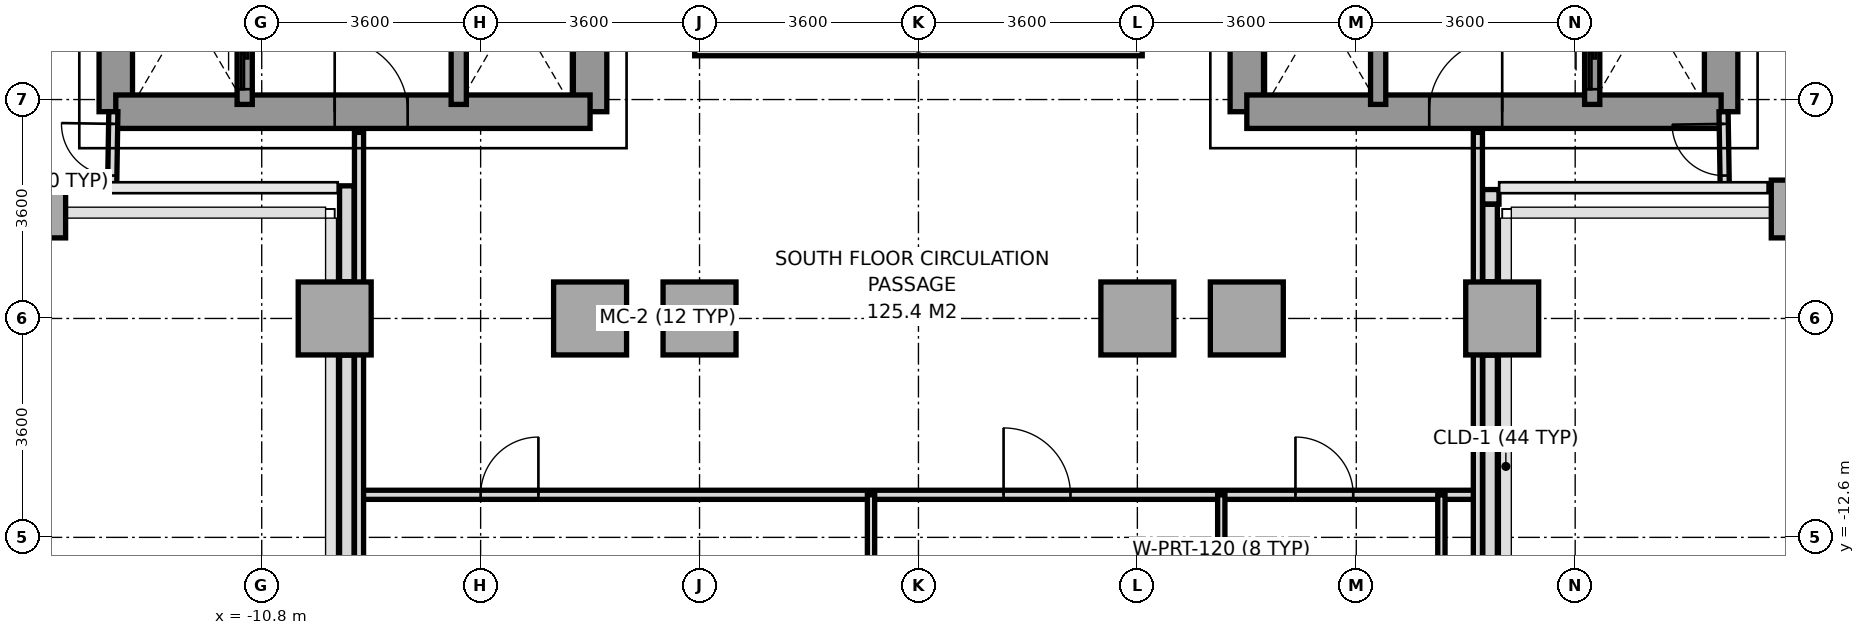
"""IFC4 building model, lengths in metres.
Left out: names, types, materials, properties, quantities, classifications, styles, units other than length and angle.
Written with IfcOpenShell. Run it as: python <this file> out.ifc"""

import sys

from ifc_helpers import new_model, si_unit, direction, frame, frame_2d, origin, origin_2d, place, context, subcontext, project, spatial, rectangle, extrude, source, transform, mapped, element, fill, save


model = new_model("IFC4")
c1 = context("Model", 3, precision=1e-05, world=origin(), true_north=direction((0.0, 1.0)))
c2 = subcontext(c1, "Body", "Model", "MODEL_VIEW")
j1 = project(units=[si_unit("LENGTHUNIT", "METRE"), si_unit("PLANEANGLEUNIT", "RADIAN")], contexts=[c1])
p1 = place(None, origin())
s1 = spatial("IfcSite", under=j1, at=p1, CompositionType="ELEMENT")
p2 = place(p1, origin())
s2 = spatial("IfcBuilding", under=s1, at=p2, CompositionType="ELEMENT")
p3 = place(p2, frame((0.0, 0.0, 81.6)))
s3 = spatial("IfcBuildingStorey", under=s2, at=p3, CompositionType="ELEMENT", Elevation=81.6)
m1 = source(origin(), c2, "Body", "SweptSolid", [
    extrude(rectangle(XDim=0.75, YDim=0.95, at=origin_2d()), origin(), (0.0, 0.0, 1.0), 3.2),
])
p4 = place(p3, frame((-14.4, -7.2, 0.0), z_axis=(0.0, 0.0, 1.0), x_axis=(1.0, 0.0, 0.0)))
e1 = element("IfcColumn", 1, at=p4, inside=s3, PredefinedType="COLUMN", context=c2, shape_type="MappedRepresentation", body=[
    mapped(m1, transform((0.0, 0.0, 0.0), x_axis=(1.0, 0.0, 0.0), y_axis=(0.0, 1.0, 0.0), z_axis=(0.0, 0.0, 1.0), scale=1.0)),
])
m2 = source(origin(), c2, "Body", "SweptSolid", [
    extrude(rectangle(XDim=1.2, YDim=1.2, at=origin_2d()), origin(), (0.0, 0.0, 1.0), 3.2),
])
for number, where, z_axis, x_axis in (
    (2, (-9.6, -9.0, 0.0), (0.0, 0.0, 1.0), (1.0, 0.0, 0.0)),
    (3, (-5.4, -9.0, 0.0), (0.0, 0.0, 1.0), (1.0, 0.0, 0.0)),
    (4, (-3.6, -9.0, 0.0), (0.0, 0.0, 1.0), (1.0, 0.0, 0.0)),
    (5, (3.6, -9.0, 0.0), (0.0, 0.0, 1.0), (1.0, 0.0, 0.0)),
    (6, (5.4, -9.0, 0.0), (0.0, 0.0, 1.0), (1.0, 0.0, 0.0)),
    (7, (9.6, -9.0, 0.0), (0.0, 0.0, 1.0), (1.0, 0.0, 0.0)),
):
    element("IfcColumn", number, at=place(p3, frame(where, z_axis=z_axis, x_axis=x_axis)), inside=s3, PredefinedType="COLUMN", context=c2, shape_type="MappedRepresentation", body=[
        mapped(m2, transform((0.0, 0.0, 0.0), x_axis=(1.0, 0.0, 0.0), y_axis=(0.0, 1.0, 0.0), z_axis=(0.0, 0.0, 1.0), scale=1.0)),
    ])
p5 = place(p3, frame((14.4, -7.2, 0.0), z_axis=(0.0, 0.0, 1.0), x_axis=(1.0, 0.0, 0.0)))
e8 = element("IfcColumn", 8, at=p5, inside=s3, PredefinedType="COLUMN", context=c2, shape_type="MappedRepresentation", body=[
    mapped(m1, transform((0.0, 0.0, 0.0), x_axis=(1.0, 0.0, 0.0), y_axis=(0.0, 1.0, 0.0), z_axis=(0.0, 0.0, 1.0), scale=1.0)),
])
p6 = place(p3, frame((9.547, -7.0, 0.0), z_axis=(0.0, 0.0, 1.0), x_axis=(-1.0, 0.0, 0.0)))
e9 = element("IfcWall", 9, at=p6, inside=s3, PredefinedType="PARAPET", context=c2, shape_type="SweptSolid", body=[
    extrude(rectangle(XDim=0.269, YDim=0.24, at=frame_2d((0.135, 0.0))), origin(), (0.0, 0.0, 1.0), 1.15),
])
p7 = place(p3, frame((9.4, -7.123, 0.0), z_axis=(0.0, 0.0, 1.0), x_axis=(0.0, -1.0, 0.0)))
e10 = element("IfcWall", 10, at=p7, inside=s3, PredefinedType="PARAPET", context=c2, shape_type="SweptSolid", body=[
    extrude(rectangle(XDim=1.274, YDim=0.24, at=frame_2d((0.637, 0.0))), origin(), (0.0, 0.0, 1.0), 1.15),
])
p8 = place(p3, frame((9.4, -9.603, 0.0), z_axis=(0.0, 0.0, 1.0), x_axis=(0.0, -1.0, 0.0)))
e11 = element("IfcWall", 11, at=p8, inside=s3, PredefinedType="PARAPET", context=c2, shape_type="SweptSolid", body=[
    extrude(rectangle(XDim=6.0, YDim=0.24, at=frame_2d((3.0, 0.0))), origin(), (0.0, 0.0, 1.0), 1.15),
])
p9 = place(p3, frame((-9.4, -15.358, 0.0), z_axis=(0.0, 0.0, 1.0), x_axis=(0.0, 1.0, 0.0)))
e12 = element("IfcWall", 12, at=p9, inside=s3, PredefinedType="PARAPET", context=c2, shape_type="SweptSolid", body=[
    extrude(rectangle(XDim=5.755, YDim=0.24, at=frame_2d((2.877, 0.0))), origin(), (0.0, 0.0, 1.0), 1.15),
])
p10 = place(p3, frame((-9.4, -8.397, 0.0), z_axis=(0.0, 0.0, 1.0), x_axis=(0.0, 1.0, 0.0)))
e13 = element("IfcWall", 13, at=p10, inside=s3, PredefinedType="PARAPET", context=c2, shape_type="SweptSolid", body=[
    extrude(rectangle(XDim=1.578, YDim=0.24, at=frame_2d((0.789, 0.0))), origin(), (0.0, 0.0, 1.0), 1.15),
])
p11 = place(p3, frame((-13.2, -5.6, 0.0), z_axis=(0.0, 0.0, 1.0), x_axis=(0.0, 1.0, 0.0)))
e14 = element("IfcWall", 14, at=p11, inside=s3, PredefinedType="SHEAR", context=c2, shape_type="SweptSolid", body=[
    extrude(rectangle(XDim=11.2, YDim=0.55, at=frame_2d((5.6, 0.0))), origin(), (0.0, 0.0, 1.0), 3.2),
])
p12 = place(p3, frame((-5.4, -5.6, 0.0), z_axis=(0.0, 0.0, 1.0), x_axis=(0.0, 1.0, 0.0)))
e15 = element("IfcWall", 15, at=p12, inside=s3, PredefinedType="SHEAR", context=c2, shape_type="SweptSolid", body=[
    extrude(rectangle(XDim=12.5, YDim=0.55, at=frame_2d((6.25, 0.0))), origin(), (0.0, 0.0, 1.0), 3.2),
])
p13 = place(p12, frame((4.55, 0.0, 0.0)))
e16 = element("IfcOpeningElement", 16, at=p13, cuts=e15, PredefinedType="OPENING", context=c2, shape_type="SweptSolid", body=[
    extrude(rectangle(XDim=1.2, YDim=2.2, at=frame_2d((0.6, 1.1))), frame((0.0, 0.285, 0.0), z_axis=(0.0, -1.0, 0.0), x_axis=(1.0, 0.0, 0.0)), (0.0, 0.0, 1.0), 0.57),
])
p14 = place(p12, frame((6.86, 0.0, 0.0)))
e17 = element("IfcOpeningElement", 17, at=p14, cuts=e15, PredefinedType="OPENING", context=c2, shape_type="SweptSolid", body=[
    extrude(rectangle(XDim=0.8, YDim=2.1, at=frame_2d((0.4, 1.05))), frame((0.0, 0.285, 0.0), z_axis=(0.0, -1.0, 0.0), x_axis=(1.0, 0.0, 0.0)), (0.0, 0.0, 1.0), 0.57),
])
p15 = place(p12, frame((7.88, 0.0, 0.0)))
e18 = element("IfcOpeningElement", 18, at=p15, cuts=e15, PredefinedType="OPENING", context=c2, shape_type="SweptSolid", body=[
    extrude(rectangle(XDim=0.8, YDim=2.1, at=frame_2d((0.4, 1.05))), frame((0.0, 0.285, 0.0), z_axis=(0.0, -1.0, 0.0), x_axis=(1.0, 0.0, 0.0)), (0.0, 0.0, 1.0), 0.57),
])
p16 = place(p3, frame((-13.2, -5.6, 0.0), z_axis=(0.0, 0.0, 1.0), x_axis=(1.0, 0.0, 0.0)))
e19 = element("IfcWall", 19, at=p16, inside=s3, PredefinedType="SHEAR", context=c2, shape_type="SweptSolid", body=[
    extrude(rectangle(XDim=7.8, YDim=0.55, at=frame_2d((3.9, 0.0))), origin(), (0.0, 0.0, 1.0), 3.2),
])
p17 = place(p16, frame((3.6, 0.0, 0.0)))
e20 = element("IfcOpeningElement", 20, at=p17, cuts=e19, PredefinedType="OPENING", context=c2, shape_type="SweptSolid", body=[
    extrude(rectangle(XDim=1.2, YDim=2.2, at=frame_2d((0.6, 1.1))), frame((0.0, 0.285, 0.0), z_axis=(0.0, -1.0, 0.0), x_axis=(1.0, 0.0, 0.0)), (0.0, 0.0, 1.0), 0.57),
])
p18 = place(p3, frame((13.2, -5.6, 0.0), z_axis=(0.0, 0.0, 1.0), x_axis=(0.0, 1.0, 0.0)))
e21 = element("IfcWall", 21, at=p18, inside=s3, PredefinedType="SHEAR", context=c2, shape_type="SweptSolid", body=[
    extrude(rectangle(XDim=11.2, YDim=0.55, at=frame_2d((5.6, 0.0))), origin(), (0.0, 0.0, 1.0), 3.2),
])
p19 = place(p3, frame((5.4, -5.6, 0.0), z_axis=(0.0, 0.0, 1.0), x_axis=(0.0, 1.0, 0.0)))
e22 = element("IfcWall", 22, at=p19, inside=s3, PredefinedType="SHEAR", context=c2, shape_type="SweptSolid", body=[
    extrude(rectangle(XDim=12.5, YDim=0.55, at=frame_2d((6.25, 0.0))), origin(), (0.0, 0.0, 1.0), 3.2),
])
p20 = place(p19, frame((4.55, 0.0, 0.0)))
e23 = element("IfcOpeningElement", 23, at=p20, cuts=e22, PredefinedType="OPENING", context=c2, shape_type="SweptSolid", body=[
    extrude(rectangle(XDim=1.2, YDim=2.2, at=frame_2d((0.6, 1.1))), frame((0.0, 0.285, 0.0), z_axis=(0.0, -1.0, 0.0), x_axis=(1.0, 0.0, 0.0)), (0.0, 0.0, 1.0), 0.57),
])
p21 = place(p3, frame((5.4, -5.6, 0.0), z_axis=(0.0, 0.0, 1.0), x_axis=(1.0, 0.0, 0.0)))
e24 = element("IfcWall", 24, at=p21, inside=s3, PredefinedType="SHEAR", context=c2, shape_type="SweptSolid", body=[
    extrude(rectangle(XDim=7.8, YDim=0.55, at=frame_2d((3.9, 0.0))), origin(), (0.0, 0.0, 1.0), 3.2),
])
p22 = place(p21, frame((3.0, 0.0, 0.0)))
e25 = element("IfcOpeningElement", 25, at=p22, cuts=e24, PredefinedType="OPENING", context=c2, shape_type="SweptSolid", body=[
    extrude(rectangle(XDim=1.2, YDim=2.2, at=frame_2d((0.6, 1.1))), frame((0.0, 0.285, 0.0), z_axis=(0.0, -1.0, 0.0), x_axis=(1.0, 0.0, 0.0)), (0.0, 0.0, 1.0), 0.57),
])
p23 = place(p3, frame((-11.08, -5.48, 0.0), z_axis=(0.0, 0.0, 1.0), x_axis=(0.0, 1.0, 0.0)))
e26 = element("IfcWall", 26, at=p23, inside=s3, PredefinedType="SOLIDWALL", context=c2, shape_type="SweptSolid", body=[
    extrude(rectangle(XDim=1.6, YDim=0.25, at=frame_2d((0.8, 0.0))), origin(), (0.0, 0.0, 1.0), 3.2),
])
p24 = place(p23, frame((0.25, 0.0, 0.0)))
e27 = element("IfcOpeningElement", 27, at=p24, cuts=e26, PredefinedType="OPENING", context=c2, shape_type="SweptSolid", body=[
    extrude(rectangle(XDim=1.1, YDim=2.2, at=frame_2d((0.55, 1.1))), frame((0.0, 0.135, 0.0), z_axis=(0.0, -1.0, 0.0), x_axis=(1.0, 0.0, 0.0)), (0.0, 0.0, 1.0), 0.27),
])
p25 = place(p3, frame((11.08, -5.48, 0.0), z_axis=(0.0, 0.0, 1.0), x_axis=(0.0, 1.0, 0.0)))
e28 = element("IfcWall", 28, at=p25, inside=s3, PredefinedType="SOLIDWALL", context=c2, shape_type="SweptSolid", body=[
    extrude(rectangle(XDim=1.6, YDim=0.25, at=frame_2d((0.8, 0.0))), origin(), (0.0, 0.0, 1.0), 3.2),
])
p26 = place(p25, frame((0.25, 0.0, 0.0)))
e29 = element("IfcOpeningElement", 29, at=p26, cuts=e28, PredefinedType="OPENING", context=c2, shape_type="SweptSolid", body=[
    extrude(rectangle(XDim=1.1, YDim=2.2, at=frame_2d((0.55, 1.1))), frame((0.0, 0.135, 0.0), z_axis=(0.0, -1.0, 0.0), x_axis=(1.0, 0.0, 0.0)), (0.0, 0.0, 1.0), 0.27),
])
for number, where, z_axis, x_axis in (
    (30, (-7.56, -5.48, 0.0), (0.0, 0.0, 1.0), (0.0, 1.0, 0.0)),
    (31, (7.56, -5.48, 0.0), (0.0, 0.0, 1.0), (0.0, 1.0, 0.0)),
):
    element("IfcWall", number, at=place(p3, frame(where, z_axis=z_axis, x_axis=x_axis)), inside=s3, PredefinedType="SOLIDWALL", context=c2, shape_type="SweptSolid", body=[
        extrude(rectangle(XDim=1.6, YDim=0.25, at=frame_2d((0.8, 0.0))), origin(), (0.0, 0.0, 1.0), 3.2),
    ])
p27 = place(p3, frame((-9.2, -11.9, 0.0), z_axis=(0.0, 0.0, 1.0), x_axis=(1.0, 0.0, 0.0)))
e32 = element("IfcWall", 32, at=p27, inside=s3, PredefinedType="PARTITIONING", context=c2, shape_type="SweptSolid", body=[
    extrude(rectangle(XDim=18.4, YDim=0.15, at=frame_2d((9.2, 0.0))), origin(), (0.0, 0.0, 1.0), 3.2),
])
p28 = place(p27, frame((15.4, 0.0, 0.0)))
e33 = element("IfcOpeningElement", 33, at=p28, cuts=e32, PredefinedType="OPENING", context=c2, shape_type="SweptSolid", body=[
    extrude(rectangle(XDim=0.95, YDim=2.15, at=frame_2d((0.475, 1.075))), frame((0.0, 0.085, 0.0), z_axis=(0.0, -1.0, 0.0), x_axis=(1.0, 0.0, 0.0)), (0.0, 0.0, 1.0), 0.17),
])
p29 = place(p27, frame((2.0, 0.0, 0.0)))
e34 = element("IfcOpeningElement", 34, at=p29, cuts=e32, PredefinedType="OPENING", context=c2, shape_type="SweptSolid", body=[
    extrude(rectangle(XDim=0.95, YDim=2.15, at=frame_2d((0.475, 1.075))), frame((0.0, 0.085, 0.0), z_axis=(0.0, -1.0, 0.0), x_axis=(1.0, 0.0, 0.0)), (0.0, 0.0, 1.0), 0.17),
])
p30 = place(p27, frame((10.6, 0.0, 0.0)))
e35 = element("IfcOpeningElement", 35, at=p30, cuts=e32, PredefinedType="OPENING", context=c2, shape_type="SweptSolid", body=[
    extrude(rectangle(XDim=1.1, YDim=2.2, at=frame_2d((0.55, 1.1))), frame((0.0, 0.085, 0.0), z_axis=(0.0, -1.0, 0.0), x_axis=(1.0, 0.0, 0.0)), (0.0, 0.0, 1.0), 0.17),
])
for number, where, z_axis, x_axis in (
    (36, (-9.2, -15.68, 0.0), (0.0, 0.0, 1.0), (0.0, 1.0, 0.0)),
    (37, (9.2, -15.68, 0.0), (0.0, 0.0, 1.0), (0.0, 1.0, 0.0)),
):
    element("IfcWall", number, at=place(p3, frame(where, z_axis=z_axis, x_axis=x_axis)), inside=s3, PredefinedType="PARTITIONING", context=c2, shape_type="SweptSolid", body=[
        extrude(rectangle(XDim=9.74, YDim=0.15, at=frame_2d((4.87, 0.0))), origin(), (0.0, 0.0, 1.0), 2.71),
    ])
p31 = place(p3, frame((4.98, -15.4, 0.0), z_axis=(0.0, 0.0, 1.0), x_axis=(0.0, 1.0, 0.0)))
e38 = element("IfcWall", 38, at=p31, inside=s3, PredefinedType="PARTITIONING", context=c2, shape_type="SweptSolid", body=[
    extrude(rectangle(XDim=3.5, YDim=0.12, at=frame_2d((1.75, 0.0))), origin(), (0.0, 0.0, 1.0), 2.71),
])
p32 = place(p3, frame((8.6, -15.4, 0.0), z_axis=(0.0, 0.0, 1.0), x_axis=(0.0, 1.0, 0.0)))
e39 = element("IfcWall", 39, at=p32, inside=s3, PredefinedType="PARTITIONING", context=c2, shape_type="SweptSolid", body=[
    extrude(rectangle(XDim=3.5, YDim=0.12, at=frame_2d((1.75, 0.0))), origin(), (0.0, 0.0, 1.0), 3.2),
])
p33 = place(p3, frame((-0.78, -24.65, 0.0), z_axis=(0.0, 0.0, 1.0), x_axis=(0.0, 1.0, 0.0)))
e40 = element("IfcWall", 40, at=p33, inside=s3, PredefinedType="PARTITIONING", context=c2, shape_type="SweptSolid", body=[
    extrude(rectangle(XDim=12.75, YDim=0.12, at=frame_2d((6.375, 0.0))), origin(), (0.0, 0.0, 1.0), 2.71),
])
p34 = place(p3, frame((-13.26, -6.85, 0.0), z_axis=(0.0, 0.0, 1.0), x_axis=(0.016013571389, 0.999871774545, 0.0)))
e41 = element("IfcWall", 41, at=p34, inside=s3, PredefinedType="PARTITIONING", context=c2, shape_type="SweptSolid", body=[
    extrude(rectangle(XDim=1.25, YDim=0.15, at=frame_2d((0.625, 0.0))), origin(), (0.0, 0.0, 1.0), 3.2),
])
p35 = place(p34, frame((0.2, 0.0, 0.0)))
e42 = element("IfcOpeningElement", 42, at=p35, cuts=e41, PredefinedType="OPENING", context=c2, shape_type="SweptSolid", body=[
    extrude(rectangle(XDim=0.85, YDim=2.1, at=frame_2d((0.425, 1.05))), frame((0.0, 0.085, 0.0), z_axis=(0.0, -1.0, 0.0), x_axis=(1.0, 0.0, 0.0)), (0.0, 0.0, 1.0), 0.17),
])
p36 = place(p3, frame((13.26, -6.85, 0.0), z_axis=(0.0, 0.0, 1.0), x_axis=(-0.016013571389, 0.999871774545, 0.0)))
e43 = element("IfcWall", 43, at=p36, inside=s3, PredefinedType="PARTITIONING", context=c2, shape_type="SweptSolid", body=[
    extrude(rectangle(XDim=1.25, YDim=0.15, at=frame_2d((0.625, 0.0))), origin(), (0.0, 0.0, 1.0), 3.2),
])
p37 = place(p36, frame((0.2, 0.0, 0.0)))
e44 = element("IfcOpeningElement", 44, at=p37, cuts=e43, PredefinedType="OPENING", context=c2, shape_type="SweptSolid", body=[
    extrude(rectangle(XDim=0.85, YDim=2.1, at=frame_2d((0.425, 1.05))), frame((0.0, 0.085, 0.0), z_axis=(0.0, -1.0, 0.0), x_axis=(1.0, 0.0, 0.0)), (0.0, 0.0, 1.0), 0.17),
])
p38 = place(p3, frame((-3.68, -4.56, 0.0), z_axis=(0.0, 0.0, 1.0), x_axis=(1.0, 0.0, 0.0)))
e45 = element("IfcWall", 45, at=p38, inside=s3, PredefinedType="PARAPET", context=c2, shape_type="SweptSolid", body=[
    extrude(rectangle(XDim=7.36, YDim=0.24, at=frame_2d((3.68, 0.0))), origin(), (0.0, 0.0, 1.0), 1.15),
])
m3 = source(origin(), c2, "Body", "SweptSolid", [
    extrude(rectangle(XDim=1.2, YDim=2.2, at=frame_2d((0.6, 1.1))), frame((0.0, 0.025, 0.0), z_axis=(0.0, -1.0, 0.0), x_axis=(1.0, 0.0, 0.0)), (0.0, 0.0, 1.0), 0.05),
])
p39 = place(p17, origin())
e46 = element("IfcDoor", 46, at=p39, inside=s3, OperationType="SINGLE_SWING_LEFT", PredefinedType="DOOR", context=c2, shape_type="MappedRepresentation", body=[
    mapped(m3, transform((0.0, 0.0, 0.0), x_axis=(1.0, 0.0, 0.0), y_axis=(0.0, 1.0, 0.0), z_axis=(0.0, 0.0, 1.0), scale=1.0)),
])
fill(e20, e46)
p40 = place(p22, origin())
e47 = element("IfcDoor", 47, at=p40, inside=s3, OperationType="SINGLE_SWING_RIGHT", PredefinedType="DOOR", context=c2, shape_type="MappedRepresentation", body=[
    mapped(m3, transform((0.0, 0.0, 0.0), x_axis=(1.0, 0.0, 0.0), y_axis=(0.0, 1.0, 0.0), z_axis=(0.0, 0.0, 1.0), scale=1.0)),
])
fill(e25, e47)
m4 = source(origin(), c2, "Body", "SweptSolid", [
    extrude(rectangle(XDim=1.1, YDim=2.2, at=frame_2d((0.55, 1.1))), frame((0.0, 0.025, 0.0), z_axis=(0.0, -1.0, 0.0), x_axis=(1.0, 0.0, 0.0)), (0.0, 0.0, 1.0), 0.05),
])
p41 = place(p24, origin())
e48 = element("IfcDoor", 48, at=p41, inside=s3, OperationType="SLIDING_TO_LEFT", PredefinedType="DOOR", context=c2, shape_type="MappedRepresentation", body=[
    mapped(m4, transform((0.0, 0.0, 0.0), x_axis=(1.0, 0.0, 0.0), y_axis=(0.0, 1.0, 0.0), z_axis=(0.0, 0.0, 1.0), scale=1.0)),
])
fill(e27, e48)
p42 = place(p26, origin())
e49 = element("IfcDoor", 49, at=p42, inside=s3, OperationType="SLIDING_TO_LEFT", PredefinedType="DOOR", context=c2, shape_type="MappedRepresentation", body=[
    mapped(m4, transform((0.0, 0.0, 0.0), x_axis=(1.0, 0.0, 0.0), y_axis=(0.0, 1.0, 0.0), z_axis=(0.0, 0.0, 1.0), scale=1.0)),
])
fill(e29, e49)
m5 = source(origin(), c2, "Body", "SweptSolid", [
    extrude(rectangle(XDim=0.95, YDim=2.15, at=frame_2d((0.475, 1.075))), frame((0.0, 0.025, 0.0), z_axis=(0.0, -1.0, 0.0), x_axis=(1.0, 0.0, 0.0)), (0.0, 0.0, 1.0), 0.05),
])
p43 = place(p28, origin())
e50 = element("IfcDoor", 50, at=p43, inside=s3, OperationType="SINGLE_SWING_LEFT", PredefinedType="DOOR", context=c2, shape_type="MappedRepresentation", body=[
    mapped(m5, transform((0.0, 0.0, 0.0), x_axis=(1.0, 0.0, 0.0), y_axis=(0.0, 1.0, 0.0), z_axis=(0.0, 0.0, 1.0), scale=1.0)),
])
fill(e33, e50)
p44 = place(p29, origin())
e51 = element("IfcDoor", 51, at=p44, inside=s3, OperationType="SINGLE_SWING_RIGHT", PredefinedType="DOOR", context=c2, shape_type="MappedRepresentation", body=[
    mapped(m5, transform((0.0, 0.0, 0.0), x_axis=(1.0, 0.0, 0.0), y_axis=(0.0, 1.0, 0.0), z_axis=(0.0, 0.0, 1.0), scale=1.0)),
])
fill(e34, e51)
p45 = place(p30, origin())
e52 = element("IfcDoor", 52, at=p45, inside=s3, OperationType="SINGLE_SWING_LEFT", PredefinedType="DOOR", context=c2, shape_type="MappedRepresentation", body=[
    mapped(m4, transform((0.0, 0.0, 0.0), x_axis=(1.0, 0.0, 0.0), y_axis=(0.0, 1.0, 0.0), z_axis=(0.0, 0.0, 1.0), scale=1.0)),
])
fill(e35, e52)
m6 = source(origin(), c2, "Body", "SweptSolid", [
    extrude(rectangle(XDim=0.85, YDim=2.1, at=frame_2d((0.425, 1.05))), frame((0.0, 0.025, 0.0), z_axis=(0.0, -1.0, 0.0), x_axis=(1.0, 0.0, 0.0)), (0.0, 0.0, 1.0), 0.05),
])
p46 = place(p35, origin())
e53 = element("IfcDoor", 53, at=p46, inside=s3, OperationType="SINGLE_SWING_RIGHT", PredefinedType="DOOR", context=c2, shape_type="MappedRepresentation", body=[
    mapped(m6, transform((0.0, 0.0, 0.0), x_axis=(1.0, 0.0, 0.0), y_axis=(0.0, 1.0, 0.0), z_axis=(0.0, 0.0, 1.0), scale=1.0)),
])
fill(e42, e53)
p47 = place(p37, origin())
e54 = element("IfcDoor", 54, at=p47, inside=s3, OperationType="SINGLE_SWING_RIGHT", PredefinedType="DOOR", context=c2, shape_type="MappedRepresentation", body=[
    mapped(m6, transform((0.0, 0.0, 0.0), x_axis=(1.0, 0.0, 0.0), y_axis=(0.0, 1.0, 0.0), z_axis=(0.0, 0.0, 1.0), scale=1.0)),
])
fill(e44, e54)
save(model, sys.argv[1])
